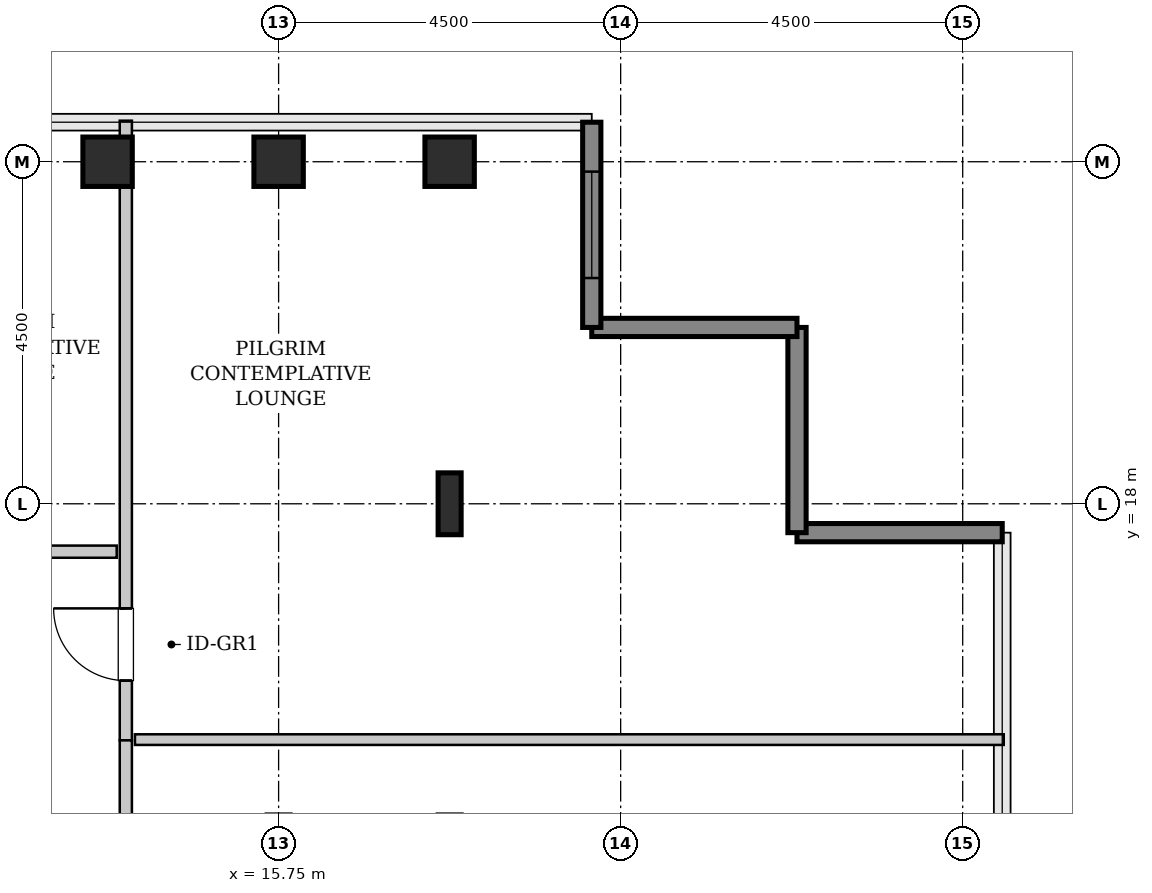
"""IFC4 building model, lengths in metres.
Left out: names, types, materials, properties, quantities, classifications, styles, units other than length and angle.
Written with IfcOpenShell. Run it as: python <this file> out.ifc"""

import sys

from ifc_helpers import new_model, si_unit, direction, frame, frame_2d, origin, origin_2d, place, context, subcontext, project, spatial, rectangle, hollow_rectangle, i_section, extrude, source, transform, mapped, element, fill, save


model = new_model("IFC4")
c1 = context("Model", 3, precision=1e-05, world=origin(), true_north=direction((0.0, 1.0)))
c2 = subcontext(c1, "Body", "Model", "MODEL_VIEW")
j1 = project(units=[si_unit("LENGTHUNIT", "METRE"), si_unit("PLANEANGLEUNIT", "RADIAN")], contexts=[c1])
p1 = place(None, origin())
s1 = spatial("IfcSite", under=j1, at=p1, CompositionType="ELEMENT")
p2 = place(p1, origin())
s2 = spatial("IfcBuilding", under=s1, at=p2, CompositionType="ELEMENT")
p3 = place(p2, frame((0.0, 0.0, 206.6)))
s3 = spatial("IfcBuildingStorey", under=s2, at=p3, CompositionType="ELEMENT", Elevation=206.6)
m1 = source(origin(), c2, "Body", "SweptSolid", [
    extrude(hollow_rectangle(XDim=0.65, YDim=0.65, WallThickness=0.032, InnerFilletRadius=0.032, OuterFilletRadius=0.064, at=origin_2d()), origin(), (0.0, 0.0, 1.0), 3.8),
])
for number, where, z_axis, x_axis in (
    (1, (13.5, 22.5, 0.0), (0.0, 0.0, 1.0), (1.0, 0.0, 0.0)),
    (2, (15.75, 22.5, 0.0), (0.0, 0.0, 1.0), (1.0, 0.0, 0.0)),
):
    element("IfcColumn", number, at=place(p3, frame(where, z_axis=z_axis, x_axis=x_axis)), inside=s3, PredefinedType="COLUMN", context=c2, shape_type="MappedRepresentation", body=[
        mapped(m1, transform((0.0, 0.0, 0.0), x_axis=(1.0, 0.0, 0.0), y_axis=(0.0, 1.0, 0.0), z_axis=(0.0, 0.0, 1.0), scale=1.0)),
    ])
m2 = source(origin(), c2, "Body", "SweptSolid", [
    extrude(i_section(OverallWidth=0.303, OverallDepth=0.814, WebThickness=0.021, FlangeThickness=0.04, FilletRadius=0.03, at=origin_2d()), origin(), (0.0, 0.0, 1.0), 3.8),
])
p4 = place(p3, frame((18.0, 18.0, 0.0), z_axis=(0.0, 0.0, 1.0), x_axis=(1.0, 0.0, 0.0)))
e3 = element("IfcColumn", 3, at=p4, inside=s3, PredefinedType="COLUMN", context=c2, shape_type="MappedRepresentation", body=[
    mapped(m2, transform((0.0, 0.0, 0.0), x_axis=(1.0, 0.0, 0.0), y_axis=(0.0, 1.0, 0.0), z_axis=(0.0, 0.0, 1.0), scale=1.0)),
])
p5 = place(p3, frame((18.0, 22.5, 0.0), z_axis=(0.0, 0.0, 1.0), x_axis=(1.0, 0.0, 0.0)))
e4 = element("IfcColumn", 4, at=p5, inside=s3, PredefinedType="COLUMN", context=c2, shape_type="MappedRepresentation", body=[
    mapped(m1, transform((0.0, 0.0, 0.0), x_axis=(1.0, 0.0, 0.0), y_axis=(0.0, 1.0, 0.0), z_axis=(0.0, 0.0, 1.0), scale=1.0)),
])
m3 = source(origin(), c2, "Body", "SweptSolid", [
    extrude(rectangle(XDim=2.7, YDim=0.24, at=frame_2d((1.35, 0.0))), origin(), (0.0, 0.0, 1.0), 3.55),
])
for number, where, z_axis, x_axis in (
    (5, (25.27, 17.62, 0.0), (0.0, 0.0, 1.0), (-1.0, 0.0, 0.0)),
    (6, (22.57, 17.62, 0.0), (0.0, 0.0, 1.0), (0.0, 1.0, 0.0)),
    (7, (22.57, 20.32, 0.0), (0.0, 0.0, 1.0), (-1.0, 0.0, 0.0)),
):
    element("IfcWall", number, at=place(p3, frame(where, z_axis=z_axis, x_axis=x_axis)), inside=s3, PredefinedType="SHEAR", context=c2, shape_type="MappedRepresentation", body=[
        mapped(m3, transform((0.0, 0.0, 0.0), x_axis=(1.0, 0.0, 0.0), y_axis=(0.0, 1.0, 0.0), z_axis=(0.0, 0.0, 1.0), scale=1.0)),
    ])
p6 = place(p3, frame((19.87, 20.32, 0.0), z_axis=(0.0, 0.0, 1.0), x_axis=(0.0, 1.0, 0.0)))
e8 = element("IfcWall", 8, at=p6, inside=s3, PredefinedType="SHEAR", context=c2, shape_type="MappedRepresentation", body=[
    mapped(m3, transform((0.0, 0.0, 0.0), x_axis=(1.0, 0.0, 0.0), y_axis=(0.0, 1.0, 0.0), z_axis=(0.0, 0.0, 1.0), scale=1.0)),
])
p7 = place(p6, frame((0.65, 0.0, 0.85)))
e9 = element("IfcOpeningElement", 9, at=p7, cuts=e8, PredefinedType="OPENING", context=c2, shape_type="SweptSolid", body=[
    extrude(rectangle(XDim=1.4, YDim=1.8, at=frame_2d((0.7, 0.9))), frame((0.0, 0.13, 0.0), z_axis=(0.0, -1.0, 0.0), x_axis=(1.0, 0.0, 0.0)), (0.0, 0.0, 1.0), 0.26),
])
m4 = source(origin(), c2, "Body", "SweptSolid", [
    extrude(rectangle(XDim=8.153, YDim=0.16, at=frame_2d((4.076, 0.0))), origin(), (0.0, 0.0, 1.0), 3.535),
])
p8 = place(p3, frame((13.74, 14.887, 0.0), z_axis=(0.0, 0.0, 1.0), x_axis=(0.0, 1.0, 0.0)))
e10 = element("IfcWall", 10, at=p8, inside=s3, PredefinedType="PARTITIONING", context=c2, shape_type="MappedRepresentation", body=[
    mapped(m4, transform((0.0, 0.0, 0.0), x_axis=(1.0, 0.0, 0.0), y_axis=(0.0, 1.0, 0.0), z_axis=(0.0, 0.0, 1.0), scale=1.0)),
])
p9 = place(p8, frame((0.786, 0.0, 0.0)))
e11 = element("IfcOpeningElement", 11, at=p9, cuts=e10, PredefinedType="OPENING", context=c2, shape_type="SweptSolid", body=[
    extrude(rectangle(XDim=0.95, YDim=2.1, at=frame_2d((0.475, 1.05))), frame((0.0, 0.09, 0.0), z_axis=(0.0, -1.0, 0.0), x_axis=(1.0, 0.0, 0.0)), (0.0, 0.0, 1.0), 0.18),
])
m5 = source(origin(), c2, "Body", "SweptSolid", [
    extrude(rectangle(XDim=11.43, YDim=0.14, at=frame_2d((5.715, 0.0))), origin(), (0.0, 0.0, 1.0), 3.535),
])
p10 = place(p3, frame((13.86, 14.897, 0.0), z_axis=(0.0, 0.0, 1.0), x_axis=(1.0, 0.0, 0.0)))
e12 = element("IfcWall", 12, at=p10, inside=s3, PredefinedType="PARTITIONING", context=c2, shape_type="MappedRepresentation", body=[
    mapped(m5, transform((0.0, 0.0, 0.0), x_axis=(1.0, 0.0, 0.0), y_axis=(0.0, 1.0, 0.0), z_axis=(0.0, 0.0, 1.0), scale=1.0)),
])
m6 = source(origin(), c2, "Body", "SweptSolid", [
    extrude(rectangle(XDim=8.093, YDim=0.16, at=frame_2d((4.046, 0.0))), origin(), (0.0, 0.0, 1.0), 3.535),
])
p11 = place(p3, frame((13.74, 6.795, 0.0), z_axis=(0.0, 0.0, 1.0), x_axis=(0.0, 1.0, 0.0)))
e13 = element("IfcWall", 13, at=p11, inside=s3, PredefinedType="PARTITIONING", context=c2, shape_type="MappedRepresentation", body=[
    mapped(m6, transform((0.0, 0.0, 0.0), x_axis=(1.0, 0.0, 0.0), y_axis=(0.0, 1.0, 0.0), z_axis=(0.0, 0.0, 1.0), scale=1.0)),
])
p12 = place(p11, frame((3.571, 0.0, 0.0)))
e14 = element("IfcOpeningElement", 14, at=p12, cuts=e13, PredefinedType="OPENING", context=c2, shape_type="SweptSolid", body=[
    extrude(rectangle(XDim=0.95, YDim=2.1, at=frame_2d((0.475, 1.05))), frame((0.0, 0.09, 0.0), z_axis=(0.0, -1.0, 0.0), x_axis=(1.0, 0.0, 0.0)), (0.0, 0.0, 1.0), 0.18),
])
m7 = source(origin(), c2, "Body", "SweptSolid", [
    extrude(rectangle(XDim=5.425, YDim=0.16, at=frame_2d((2.712, 0.0))), origin(), (0.0, 0.0, 1.0), 3.535),
])
p13 = place(p3, frame((8.195, 17.37, 0.0), z_axis=(0.0, 0.0, 1.0), x_axis=(1.0, 0.0, 0.0)))
e15 = element("IfcWall", 15, at=p13, inside=s3, PredefinedType="PARTITIONING", context=c2, shape_type="MappedRepresentation", body=[
    mapped(m7, transform((0.0, 0.0, 0.0), x_axis=(1.0, 0.0, 0.0), y_axis=(0.0, 1.0, 0.0), z_axis=(0.0, 0.0, 1.0), scale=1.0)),
])
p14 = place(p13, frame((1.611, 0.0, 0.0)))
e16 = element("IfcOpeningElement", 16, at=p14, cuts=e15, PredefinedType="OPENING", context=c2, shape_type="SweptSolid", body=[
    extrude(rectangle(XDim=0.95, YDim=2.1, at=frame_2d((0.475, 1.05))), frame((0.0, 0.09, 0.0), z_axis=(0.0, -1.0, 0.0), x_axis=(1.0, 0.0, 0.0)), (0.0, 0.0, 1.0), 0.18),
])
m8 = source(origin(), c2, "Body", "SweptSolid", [
    extrude(rectangle(XDim=1.4, YDim=1.8, at=frame_2d((0.7, 0.9))), frame((0.0, 0.03, 0.0), z_axis=(0.0, -1.0, 0.0), x_axis=(1.0, 0.0, 0.0)), (0.0, 0.0, 1.0), 0.06),
])
p15 = place(p7, origin())
e17 = element("IfcWindow", 17, at=p15, inside=s3, PartitioningType="SINGLE_PANEL", PredefinedType="WINDOW", context=c2, shape_type="MappedRepresentation", body=[
    mapped(m8, transform((0.0, 0.0, 0.0), x_axis=(1.0, 0.0, 0.0), y_axis=(0.0, 1.0, 0.0), z_axis=(0.0, 0.0, 1.0), scale=1.0)),
])
fill(e9, e17)
m9 = source(origin(), c2, "Body", "SweptSolid", [
    extrude(rectangle(XDim=0.95, YDim=2.1, at=frame_2d((0.475, 1.05))), frame((0.0, 0.025, 0.0), z_axis=(0.0, -1.0, 0.0), x_axis=(1.0, 0.0, 0.0)), (0.0, 0.0, 1.0), 0.05),
])
p16 = place(p9, origin())
e18 = element("IfcDoor", 18, at=p16, inside=s3, OperationType="SINGLE_SWING_RIGHT", PredefinedType="DOOR", context=c2, shape_type="MappedRepresentation", body=[
    mapped(m9, transform((0.0, 0.0, 0.0), x_axis=(1.0, 0.0, 0.0), y_axis=(0.0, 1.0, 0.0), z_axis=(0.0, 0.0, 1.0), scale=1.0)),
])
fill(e11, e18)
save(model, sys.argv[1])
